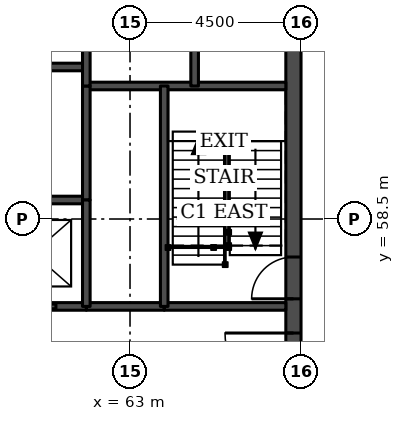
"""IFC4 building model, lengths in metres.
Left out: names, types, materials, properties, quantities, classifications, styles, units other than length and angle.
Written with IfcOpenShell. Run it as: python <this file> out.ifc"""

import sys

from ifc_helpers import new_model, si_unit, direction, frame, frame_2d, origin, place, context, subcontext, project, spatial, rectangle, extrude, element, fill, save


model = new_model("IFC4")
c1 = context("Model", 3, precision=1e-05, world=origin(), true_north=direction((0.0, 1.0)))
c2 = subcontext(c1, "Body", "Model", "MODEL_VIEW")
j1 = project(units=[si_unit("LENGTHUNIT", "METRE"), si_unit("PLANEANGLEUNIT", "RADIAN")], contexts=[c1])
p1 = place(None, origin())
s1 = spatial("IfcSite", under=j1, at=p1, CompositionType="ELEMENT")
p2 = place(p1, origin())
s2 = spatial("IfcBuilding", under=s1, at=p2, CompositionType="ELEMENT")
p3 = place(p2, frame((0.0, 0.0, 199.5)))
s3 = spatial("IfcBuildingStorey", under=s2, at=p3, CompositionType="ELEMENT", Elevation=199.5)
p4 = place(p3, frame((67.3, 49.5, 0.0), z_axis=(0.0, 0.0, 1.0), x_axis=(0.0, 1.0, 0.0)))
e1 = element("IfcWall", 1, at=p4, inside=s3, PredefinedType="SHEAR", context=c2, shape_type="SweptSolid", body=[
    extrude(rectangle(XDim=22.5, YDim=0.4, at=frame_2d((11.25, 0.0))), origin(), (0.0, 0.0, 1.0), 3.7),
])
p5 = place(p4, frame((4.2, 0.0, 0.0)))
e2 = element("IfcOpeningElement", 2, at=p5, cuts=e1, PredefinedType="OPENING", context=c2, shape_type="SweptSolid", body=[
    extrude(rectangle(XDim=1.8, YDim=2.1, at=frame_2d((0.9, 1.05))), frame((0.0, 0.21, 0.0), z_axis=(0.0, -1.0, 0.0), x_axis=(1.0, 0.0, 0.0)), (0.0, 0.0, 1.0), 0.42),
])
p6 = place(p4, frame((6.9, 0.0, 0.0)))
e3 = element("IfcOpeningElement", 3, at=p6, cuts=e1, PredefinedType="OPENING", context=c2, shape_type="SweptSolid", body=[
    extrude(rectangle(XDim=1.1, YDim=2.1, at=frame_2d((0.55, 1.05))), frame((0.0, 0.21, 0.0), z_axis=(0.0, -1.0, 0.0), x_axis=(1.0, 0.0, 0.0)), (0.0, 0.0, 1.0), 0.42),
])
p7 = place(p4, frame((13.6, 0.0, 0.0)))
e4 = element("IfcOpeningElement", 4, at=p7, cuts=e1, PredefinedType="OPENING", context=c2, shape_type="SweptSolid", body=[
    extrude(rectangle(XDim=1.1, YDim=2.1, at=frame_2d((0.55, 1.05))), frame((0.0, 0.21, 0.0), z_axis=(0.0, -1.0, 0.0), x_axis=(1.0, 0.0, 0.0)), (0.0, 0.0, 1.0), 0.42),
])
p8 = place(p4, frame((16.5, 0.0, 0.0)))
e5 = element("IfcOpeningElement", 5, at=p8, cuts=e1, PredefinedType="OPENING", context=c2, shape_type="SweptSolid", body=[
    extrude(rectangle(XDim=1.8, YDim=2.1, at=frame_2d((0.9, 1.05))), frame((0.0, 0.21, 0.0), z_axis=(0.0, -1.0, 0.0), x_axis=(1.0, 0.0, 0.0)), (0.0, 0.0, 1.0), 0.42),
])
p9 = place(p3, frame((61.85, 56.2, 0.0), z_axis=(0.0, 0.0, 1.0), x_axis=(1.0, 0.0, 0.0)))
e6 = element("IfcWall", 6, at=p9, inside=s3, PredefinedType="SOLIDWALL", context=c2, shape_type="SweptSolid", body=[
    extrude(rectangle(XDim=2.05, YDim=0.2, at=frame_2d((1.025, 0.0))), origin(), (0.0, 0.0, 1.0), 3.55),
])
p10 = place(p3, frame((50.65, 56.2, 0.0), z_axis=(0.0, 0.0, 1.0), x_axis=(1.0, 0.0, 0.0)))
e7 = element("IfcWall", 7, at=p10, inside=s3, PredefinedType="SOLIDWALL", context=c2, shape_type="SweptSolid", body=[
    extrude(rectangle(XDim=11.2, YDim=0.2, at=frame_2d((5.6, 0.0))), origin(), (0.0, 0.0, 1.0), 3.55),
])
p11 = place(p10, frame((0.8, 0.0, 0.0)))
e8 = element("IfcOpeningElement", 8, at=p11, cuts=e7, PredefinedType="OPENING", context=c2, shape_type="SweptSolid", body=[
    extrude(rectangle(XDim=1.2, YDim=2.1, at=frame_2d((0.6, 1.05))), frame((0.0, 0.11, 0.0), z_axis=(0.0, -1.0, 0.0), x_axis=(1.0, 0.0, 0.0)), (0.0, 0.0, 1.0), 0.22),
])
p12 = place(p10, frame((3.6, 0.0, 0.0)))
e9 = element("IfcOpeningElement", 9, at=p12, cuts=e7, PredefinedType="OPENING", context=c2, shape_type="SweptSolid", body=[
    extrude(rectangle(XDim=1.2, YDim=2.1, at=frame_2d((0.6, 1.05))), frame((0.0, 0.11, 0.0), z_axis=(0.0, -1.0, 0.0), x_axis=(1.0, 0.0, 0.0)), (0.0, 0.0, 1.0), 0.22),
])
p13 = place(p10, frame((6.4, 0.0, 0.0)))
e10 = element("IfcOpeningElement", 10, at=p13, cuts=e7, PredefinedType="OPENING", context=c2, shape_type="SweptSolid", body=[
    extrude(rectangle(XDim=1.2, YDim=2.1, at=frame_2d((0.6, 1.05))), frame((0.0, 0.11, 0.0), z_axis=(0.0, -1.0, 0.0), x_axis=(1.0, 0.0, 0.0)), (0.0, 0.0, 1.0), 0.22),
])
p14 = place(p10, frame((9.2, 0.0, 0.0)))
e11 = element("IfcOpeningElement", 11, at=p14, cuts=e7, PredefinedType="OPENING", context=c2, shape_type="SweptSolid", body=[
    extrude(rectangle(XDim=1.2, YDim=2.1, at=frame_2d((0.6, 1.05))), frame((0.0, 0.11, 0.0), z_axis=(0.0, -1.0, 0.0), x_axis=(1.0, 0.0, 0.0)), (0.0, 0.0, 1.0), 0.22),
])
p15 = place(p3, frame((63.9, 56.2, 0.0), z_axis=(0.0, 0.0, 1.0), x_axis=(1.0, 0.0, 0.0)))
e12 = element("IfcWall", 12, at=p15, inside=s3, PredefinedType="SOLIDWALL", context=c2, shape_type="SweptSolid", body=[
    extrude(rectangle(XDim=3.2, YDim=0.2, at=frame_2d((1.6, 0.0))), origin(), (0.0, 0.0, 1.0), 3.55),
])
p16 = place(p3, frame((50.65, 59.0, 0.0), z_axis=(0.0, 0.0, 1.0), x_axis=(1.0, 0.0, 0.0)))
e13 = element("IfcWall", 13, at=p16, inside=s3, PredefinedType="SOLIDWALL", context=c2, shape_type="SweptSolid", body=[
    extrude(rectangle(XDim=11.2, YDim=0.2, at=frame_2d((5.6, 0.0))), origin(), (0.0, 0.0, 1.0), 3.7),
])
p17 = place(p3, frame((61.85, 62.0, 0.0), z_axis=(0.0, 0.0, 1.0), x_axis=(1.0, 0.0, 0.0)))
e14 = element("IfcWall", 14, at=p17, inside=s3, PredefinedType="SOLIDWALL", context=c2, shape_type="SweptSolid", body=[
    extrude(rectangle(XDim=5.25, YDim=0.2, at=frame_2d((2.625, 0.0))), origin(), (0.0, 0.0, 1.0), 3.55),
])
p18 = place(p3, frame((50.65, 62.5, 0.0), z_axis=(0.0, 0.0, 1.0), x_axis=(1.0, 0.0, 0.0)))
e15 = element("IfcWall", 15, at=p18, inside=s3, PredefinedType="SOLIDWALL", context=c2, shape_type="SweptSolid", body=[
    extrude(rectangle(XDim=11.2, YDim=0.2, at=frame_2d((5.6, 0.0))), origin(), (0.0, 0.0, 1.0), 3.7),
])
p19 = place(p3, frame((61.85, 59.0, 0.0), z_axis=(0.0, 0.0, 1.0), x_axis=(0.0, 1.0, 0.0)))
e16 = element("IfcWall", 16, at=p19, inside=s3, PredefinedType="SOLIDWALL", context=c2, shape_type="SweptSolid", body=[
    extrude(rectangle(XDim=3.0, YDim=0.2, at=frame_2d((1.5, 0.0))), origin(), (0.0, 0.0, 1.0), 3.7),
])
p20 = place(p3, frame((61.85, 56.2, 0.0), z_axis=(0.0, 0.0, 1.0), x_axis=(0.0, 1.0, 0.0)))
e17 = element("IfcWall", 17, at=p20, inside=s3, PredefinedType="SOLIDWALL", context=c2, shape_type="SweptSolid", body=[
    extrude(rectangle(XDim=2.8, YDim=0.2, at=frame_2d((1.4, 0.0))), origin(), (0.0, 0.0, 1.0), 3.55),
])
p21 = place(p3, frame((61.85, 62.0, 0.0), z_axis=(0.0, 0.0, 1.0), x_axis=(0.0, 1.0, 0.0)))
e18 = element("IfcWall", 18, at=p21, inside=s3, PredefinedType="SOLIDWALL", context=c2, shape_type="SweptSolid", body=[
    extrude(rectangle(XDim=3.3, YDim=0.2, at=frame_2d((1.65, 0.0))), origin(), (0.0, 0.0, 1.0), 3.55),
])
p22 = place(p3, frame((63.9, 56.2, 0.0), z_axis=(0.0, 0.0, 1.0), x_axis=(0.0, 1.0, 0.0)))
e19 = element("IfcWall", 19, at=p22, inside=s3, PredefinedType="SOLIDWALL", context=c2, shape_type="SweptSolid", body=[
    extrude(rectangle(XDim=5.8, YDim=0.2, at=frame_2d((2.9, 0.0))), origin(), (0.0, 0.0, 1.0), 3.55),
])
p23 = place(p3, frame((64.7, 62.0, 0.0), z_axis=(0.0, 0.0, 1.0), x_axis=(0.0, 1.0, 0.0)))
e20 = element("IfcWall", 20, at=p23, inside=s3, PredefinedType="SOLIDWALL", context=c2, shape_type="SweptSolid", body=[
    extrude(rectangle(XDim=3.3, YDim=0.2, at=frame_2d((1.65, 0.0))), origin(), (0.0, 0.0, 1.0), 3.55),
])
p24 = place(p23, frame((1.1, 0.0, 0.0)))
e21 = element("IfcOpeningElement", 21, at=p24, cuts=e20, PredefinedType="OPENING", context=c2, shape_type="SweptSolid", body=[
    extrude(rectangle(XDim=1.1, YDim=2.1, at=frame_2d((0.55, 1.05))), frame((0.0, 0.11, 0.0), z_axis=(0.0, -1.0, 0.0), x_axis=(1.0, 0.0, 0.0)), (0.0, 0.0, 1.0), 0.22),
])
p25 = place(p14, origin())
e22 = element("IfcDoor", 22, at=p25, inside=s3, OperationType="DOUBLE_DOOR_SLIDING", PredefinedType="DOOR", context=c2, shape_type="SweptSolid", body=[
    extrude(rectangle(XDim=1.2, YDim=2.1, at=frame_2d((0.6, 1.05))), frame((0.0, 0.025, 0.0), z_axis=(0.0, -1.0, 0.0), x_axis=(1.0, 0.0, 0.0)), (0.0, 0.0, 1.0), 0.05),
])
fill(e11, e22)
p26 = place(p5, origin())
e23 = element("IfcDoor", 23, at=p26, inside=s3, OperationType="SINGLE_SWING_RIGHT", PredefinedType="DOOR", context=c2, shape_type="SweptSolid", body=[
    extrude(rectangle(XDim=1.8, YDim=2.1, at=frame_2d((0.9, 1.05))), frame((0.0, 0.025, 0.0), z_axis=(0.0, -1.0, 0.0), x_axis=(1.0, 0.0, 0.0)), (0.0, 0.0, 1.0), 0.05),
])
fill(e2, e23)
p27 = place(p6, origin())
e24 = element("IfcDoor", 24, at=p27, inside=s3, OperationType="SINGLE_SWING_LEFT", PredefinedType="DOOR", context=c2, shape_type="SweptSolid", body=[
    extrude(rectangle(XDim=1.1, YDim=2.1, at=frame_2d((0.55, 1.05))), frame((0.0, 0.025, 0.0), z_axis=(0.0, -1.0, 0.0), x_axis=(1.0, 0.0, 0.0)), (0.0, 0.0, 1.0), 0.05),
])
fill(e3, e24)
save(model, sys.argv[1])
